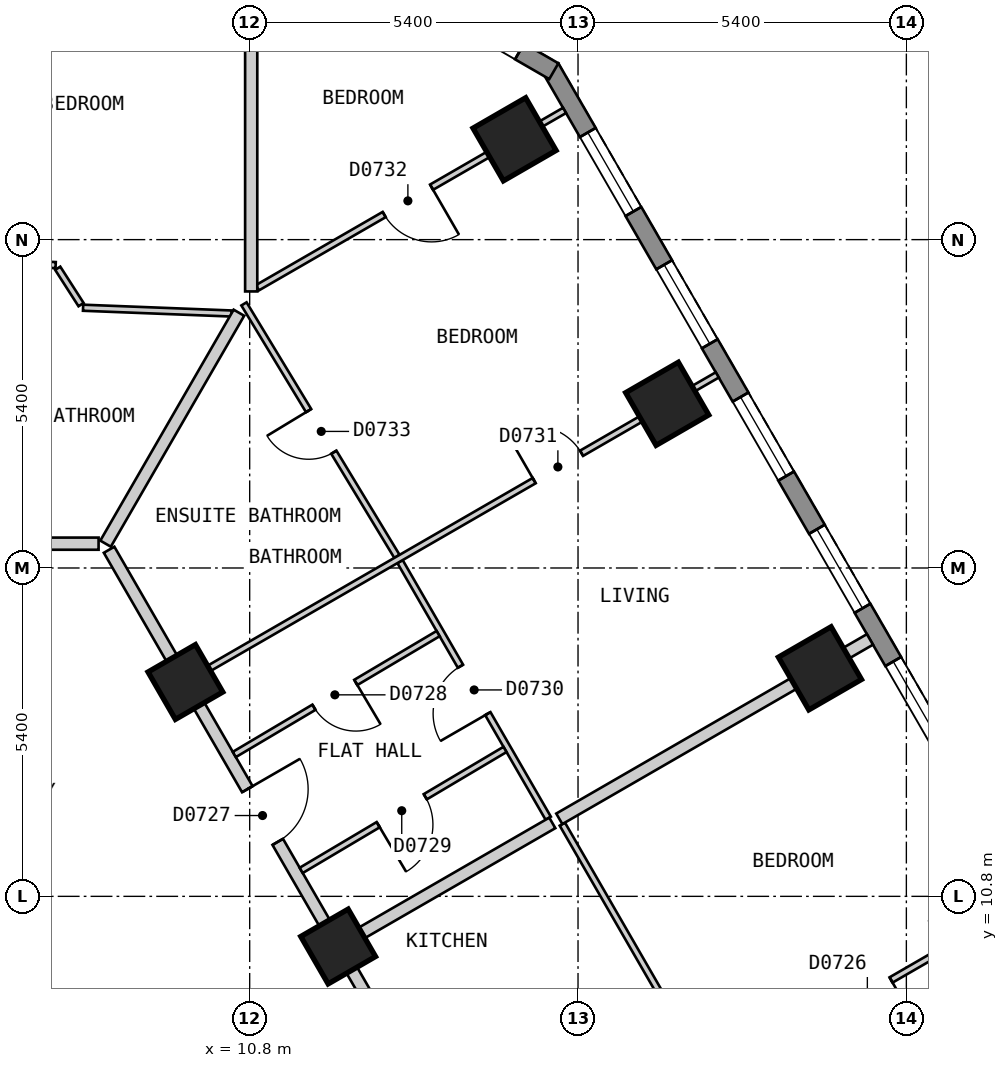
"""IFC4 building model, lengths in metres.
Left out: names, types, materials, properties, quantities, classifications, styles, units other than length and angle.
Written with IfcOpenShell. Run it as: python <this file> out.ifc"""

import sys

from ifc_helpers import new_model, si_unit, direction, frame, frame_2d, origin, origin_2d, place, context, subcontext, project, spatial, polyline, rectangle, outline, extrude, element, fill, save


model = new_model("IFC4")
c1 = context("Model", 3, precision=1e-05, world=origin(), true_north=direction((0.0, 1.0)))
c2 = subcontext(c1, "Body", "Model", "MODEL_VIEW")
j1 = project(units=[si_unit("LENGTHUNIT", "METRE"), si_unit("PLANEANGLEUNIT", "RADIAN")], contexts=[c1])
p1 = place(None, origin())
s1 = spatial("IfcSite", under=j1, at=p1, CompositionType="ELEMENT")
p2 = place(p1, origin())
s2 = spatial("IfcBuilding", under=s1, at=p2, CompositionType="ELEMENT")
p3 = place(p2, frame((0.0, 0.0, 99.0)))
s3 = spatial("IfcBuildingStorey", under=s2, at=p3, CompositionType="ELEMENT", Elevation=99.0)
for number, where, z_axis, x_axis in (
    (1, (20.179, 14.55, 0.0), (0.0, 0.0, 1.0), (-0.5, 0.866, 0.0)),
    (2, (17.667, 18.9, 0.0), (0.0, 0.0, 1.0), (-0.5, 0.866, 0.0)),
    (3, (15.156, 23.25, 0.0), (0.0, 0.0, 1.0), (-0.5, 0.866, 0.0)),
):
    element("IfcColumn", number, at=place(p3, frame(where, z_axis=z_axis, x_axis=x_axis)), inside=s3, PredefinedType="COLUMN", context=c2, shape_type="SweptSolid", body=[
        extrude(rectangle(XDim=1.0, YDim=1.0, at=origin_2d()), origin(), (0.0, 0.0, 1.0), 3.0),
    ])
for number, where, z_axis, x_axis in (
    (4, (12.255, 9.975, 0.0), (0.0, 0.0, 1.0), (-0.5, 0.866, 0.0)),
    (5, (9.743, 14.325, 0.0), (0.0, 0.0, 1.0), (-0.5, 0.866, 0.0)),
):
    element("IfcColumn", number, at=place(p3, frame(where, z_axis=z_axis, x_axis=x_axis)), inside=s3, PredefinedType="COLUMN", context=c2, shape_type="SweptSolid", body=[
        extrude(rectangle(XDim=0.9, YDim=0.9, at=origin_2d()), origin(), (0.0, 0.0, 1.0), 3.0),
    ])
p4 = place(p3, frame((29.027, 1.425, 0.0), z_axis=(0.0, 0.0, 1.0), x_axis=(-0.500027479704, 0.866009537788, 0.0)))
e6 = element("IfcWall", 6, at=p4, inside=s3, PredefinedType="SOLIDWALL", context=c2, shape_type="SweptSolid", body=[
    extrude(outline(polyline([(0.0, -0.15), (26.559, -0.15), (26.478, 0.15), (0.08, 0.15), (0.0, -0.15)])), origin(), (0.0, 0.0, 1.0), 2.7),
])
p5 = place(p4, frame((1.227, 0.0, 0.15)))
e7 = element("IfcOpeningElement", 7, at=p5, cuts=e6, PredefinedType="OPENING", context=c2, shape_type="SweptSolid", body=[
    extrude(rectangle(XDim=1.5, YDim=2.1, at=frame_2d((0.75, 1.05))), frame((0.0, 0.16, 0.0), z_axis=(0.0, -1.0, 0.0), x_axis=(1.0, 0.0, 0.0)), (0.0, 0.0, 1.0), 0.32),
])
p6 = place(p4, frame((3.738, 0.0, 0.15)))
e8 = element("IfcOpeningElement", 8, at=p6, cuts=e6, PredefinedType="OPENING", context=c2, shape_type="SweptSolid", body=[
    extrude(rectangle(XDim=1.5, YDim=2.1, at=frame_2d((0.75, 1.05))), frame((0.0, 0.16, 0.0), z_axis=(0.0, -1.0, 0.0), x_axis=(1.0, 0.0, 0.0)), (0.0, 0.0, 1.0), 0.32),
])
p7 = place(p4, frame((6.25, 0.0, 0.15)))
e9 = element("IfcOpeningElement", 9, at=p7, cuts=e6, PredefinedType="OPENING", context=c2, shape_type="SweptSolid", body=[
    extrude(rectangle(XDim=1.5, YDim=2.1, at=frame_2d((0.75, 1.05))), frame((0.0, 0.16, 0.0), z_axis=(0.0, -1.0, 0.0), x_axis=(1.0, 0.0, 0.0)), (0.0, 0.0, 1.0), 0.32),
])
p8 = place(p4, frame((8.761, 0.0, 0.15)))
e10 = element("IfcOpeningElement", 10, at=p8, cuts=e6, PredefinedType="OPENING", context=c2, shape_type="SweptSolid", body=[
    extrude(rectangle(XDim=1.5, YDim=2.1, at=frame_2d((0.75, 1.05))), frame((0.0, 0.16, 0.0), z_axis=(0.0, -1.0, 0.0), x_axis=(1.0, 0.0, 0.0)), (0.0, 0.0, 1.0), 0.32),
])
p9 = place(p4, frame((11.273, 0.0, 0.15)))
e11 = element("IfcOpeningElement", 11, at=p9, cuts=e6, PredefinedType="OPENING", context=c2, shape_type="SweptSolid", body=[
    extrude(rectangle(XDim=1.5, YDim=2.1, at=frame_2d((0.75, 1.05))), frame((0.0, 0.16, 0.0), z_axis=(0.0, -1.0, 0.0), x_axis=(1.0, 0.0, 0.0)), (0.0, 0.0, 1.0), 0.32),
])
p10 = place(p4, frame((13.785, 0.0, 0.15)))
e12 = element("IfcOpeningElement", 12, at=p10, cuts=e6, PredefinedType="OPENING", context=c2, shape_type="SweptSolid", body=[
    extrude(rectangle(XDim=1.5, YDim=2.1, at=frame_2d((0.75, 1.05))), frame((0.0, 0.16, 0.0), z_axis=(0.0, -1.0, 0.0), x_axis=(1.0, 0.0, 0.0)), (0.0, 0.0, 1.0), 0.32),
])
p11 = place(p4, frame((16.296, 0.0, 0.15)))
e13 = element("IfcOpeningElement", 13, at=p11, cuts=e6, PredefinedType="OPENING", context=c2, shape_type="SweptSolid", body=[
    extrude(rectangle(XDim=1.5, YDim=2.1, at=frame_2d((0.75, 1.05))), frame((0.0, 0.16, 0.0), z_axis=(0.0, -1.0, 0.0), x_axis=(1.0, 0.0, 0.0)), (0.0, 0.0, 1.0), 0.32),
])
p12 = place(p4, frame((18.807, 0.0, 0.15)))
e14 = element("IfcOpeningElement", 14, at=p12, cuts=e6, PredefinedType="OPENING", context=c2, shape_type="SweptSolid", body=[
    extrude(rectangle(XDim=1.5, YDim=2.1, at=frame_2d((0.75, 1.05))), frame((0.0, 0.16, 0.0), z_axis=(0.0, -1.0, 0.0), x_axis=(1.0, 0.0, 0.0)), (0.0, 0.0, 1.0), 0.32),
])
p13 = place(p4, frame((21.319, 0.0, 0.15)))
e15 = element("IfcOpeningElement", 15, at=p13, cuts=e6, PredefinedType="OPENING", context=c2, shape_type="SweptSolid", body=[
    extrude(rectangle(XDim=1.5, YDim=2.1, at=frame_2d((0.75, 1.05))), frame((0.0, 0.16, 0.0), z_axis=(0.0, -1.0, 0.0), x_axis=(1.0, 0.0, 0.0)), (0.0, 0.0, 1.0), 0.32),
])
p14 = place(p4, frame((23.831, 0.0, 0.15)))
e16 = element("IfcOpeningElement", 16, at=p14, cuts=e6, PredefinedType="OPENING", context=c2, shape_type="SweptSolid", body=[
    extrude(rectangle(XDim=1.5, YDim=2.1, at=frame_2d((0.75, 1.05))), frame((0.0, 0.16, 0.0), z_axis=(0.0, -1.0, 0.0), x_axis=(1.0, 0.0, 0.0)), (0.0, 0.0, 1.0), 0.32),
])
p15 = place(p3, frame((15.802, 24.37, 0.0), z_axis=(0.0, 0.0, 1.0), x_axis=(-0.866022959057, 0.500004234368, 0.0)))
e17 = element("IfcWall", 17, at=p15, inside=s3, PredefinedType="SOLIDWALL", context=c2, shape_type="SweptSolid", body=[
    extrude(outline(polyline([(0.0, -0.15), (5.0, -0.15), (4.92, 0.15), (0.08, 0.15), (0.0, -0.15)])), origin(), (0.0, 0.0, 1.0), 2.7),
])
p16 = place(p15, frame((0.65, 0.0, 0.15)))
e18 = element("IfcOpeningElement", 18, at=p16, cuts=e17, PredefinedType="OPENING", context=c2, shape_type="SweptSolid", body=[
    extrude(rectangle(XDim=1.2, YDim=2.1, at=frame_2d((0.6, 1.05))), frame((0.0, 0.16, 0.0), z_axis=(0.0, -1.0, 0.0), x_axis=(1.0, 0.0, 0.0)), (0.0, 0.0, 1.0), 0.32),
])
p17 = place(p15, frame((3.15, 0.0, 0.15)))
e19 = element("IfcOpeningElement", 19, at=p17, cuts=e17, PredefinedType="OPENING", context=c2, shape_type="SweptSolid", body=[
    extrude(rectangle(XDim=1.2, YDim=2.1, at=frame_2d((0.6, 1.05))), frame((0.0, 0.16, 0.0), z_axis=(0.0, -1.0, 0.0), x_axis=(1.0, 0.0, 0.0)), (0.0, 0.0, 1.0), 0.32),
])
p18 = place(p3, frame((8.488, 16.5, 0.0), z_axis=(0.0, 0.0, 1.0), x_axis=(0.499986836607, -0.86603300354, 0.0)))
e20 = element("IfcWall", 20, at=p18, inside=s3, PredefinedType="PARTITIONING", context=c2, shape_type="SweptSolid", body=[
    extrude(rectangle(XDim=20.09, YDim=0.2, at=frame_2d((10.045, 0.0))), origin(), (0.0, 0.0, 1.0), 2.7),
])
p19 = place(p18, frame((14.569, 0.0, 0.0)))
e21 = element("IfcOpeningElement", 21, at=p19, cuts=e20, PredefinedType="OPENING", context=c2, shape_type="SweptSolid", body=[
    extrude(rectangle(XDim=1.0, YDim=2.1, at=frame_2d((0.5, 1.05))), frame((0.0, 0.11, 0.0), z_axis=(0.0, -1.0, 0.0), x_axis=(1.0, 0.0, 0.0)), (0.0, 0.0, 1.0), 0.22),
])
p20 = place(p18, frame((4.547, 0.0, 0.0)))
e22 = element("IfcOpeningElement", 22, at=p20, cuts=e20, PredefinedType="OPENING", context=c2, shape_type="SweptSolid", body=[
    extrude(rectangle(XDim=1.0, YDim=2.1, at=frame_2d((0.5, 1.05))), frame((0.0, 0.11, 0.0), z_axis=(0.0, -1.0, 0.0), x_axis=(1.0, 0.0, 0.0)), (0.0, 0.0, 1.0), 0.22),
])
p21 = place(p3, frame((5.889, 16.6, 0.0), z_axis=(0.0, 0.0, 1.0), x_axis=(1.0, 0.0, 0.0)))
e23 = element("IfcWall", 23, at=p21, inside=s3, PredefinedType="PARTITIONING", context=c2, shape_type="SweptSolid", body=[
    extrude(rectangle(XDim=2.426, YDim=0.2, at=frame_2d((1.213, 0.0))), origin(), (0.0, 0.0, 1.0), 2.7),
])
p22 = place(p3, frame((7.643, 21.129, 0.0), z_axis=(0.0, 0.0, 1.0), x_axis=(0.540427628168, -0.841390503104, 0.0)))
e24 = element("IfcWall", 24, at=p22, inside=s3, PredefinedType="PARTITIONING", context=c2, shape_type="SweptSolid", body=[
    extrude(rectangle(XDim=0.711, YDim=0.1, at=frame_2d((0.355, 0.0))), origin(), (0.0, 0.0, 1.0), 2.7),
])
p23 = place(p3, frame((10.706, 20.543, 0.0), z_axis=(0.0, 0.0, 1.0), x_axis=(0.518240414093, -0.855234981278, 0.0)))
e25 = element("IfcWall", 25, at=p23, inside=s3, PredefinedType="PARTITIONING", context=c2, shape_type="SweptSolid", body=[
    extrude(rectangle(XDim=4.855, YDim=0.1, at=frame_2d((2.427, 0.0))), origin(), (0.0, 0.0, 1.0), 2.7),
])
p24 = place(p23, frame((2.052, 0.0, 0.0)))
e26 = element("IfcOpeningElement", 26, at=p24, cuts=e25, PredefinedType="OPENING", context=c2, shape_type="SweptSolid", body=[
    extrude(rectangle(XDim=0.8, YDim=2.1, at=frame_2d((0.4, 1.05))), frame((0.0, 0.06, 0.0), z_axis=(0.0, -1.0, 0.0), x_axis=(1.0, 0.0, 0.0)), (0.0, 0.0, 1.0), 0.12),
])
p25 = place(p3, frame((13.273, 16.305, 0.0), z_axis=(0.0, 0.0, 1.0), x_axis=(0.500093956194, -0.865971151354, 0.0)))
e27 = element("IfcWall", 27, at=p25, inside=s3, PredefinedType="PARTITIONING", context=c2, shape_type="SweptSolid", body=[
    extrude(rectangle(XDim=4.873, YDim=0.1, at=frame_2d((2.437, 0.0))), origin(), (0.0, 0.0, 1.0), 2.7),
])
p26 = place(p25, frame((1.987, 0.0, 0.0)))
e28 = element("IfcOpeningElement", 28, at=p26, cuts=e27, PredefinedType="OPENING", context=c2, shape_type="SweptSolid", body=[
    extrude(rectangle(XDim=0.9, YDim=2.1, at=frame_2d((0.45, 1.05))), frame((0.0, 0.06, 0.0), z_axis=(0.0, -1.0, 0.0), x_axis=(1.0, 0.0, 0.0)), (0.0, 0.0, 1.0), 0.12),
])
p27 = place(p3, frame((15.942, 11.988, 0.0), z_axis=(0.0, 0.0, 1.0), x_axis=(0.499995794706, -0.866027831699, 0.0)))
e29 = element("IfcWall", 29, at=p27, inside=s3, PredefinedType="PARTITIONING", context=c2, shape_type="SweptSolid", body=[
    extrude(rectangle(XDim=4.922, YDim=0.1, at=frame_2d((2.461, 0.0))), origin(), (0.0, 0.0, 1.0), 2.7),
])
p28 = place(p3, frame((8.06, 20.48, 0.0), z_axis=(0.0, 0.0, 1.0), x_axis=(0.999243345912, -0.038893902497, 0.0)))
e30 = element("IfcWall", 30, at=p28, inside=s3, PredefinedType="PARTITIONING", context=c2, shape_type="SweptSolid", body=[
    extrude(rectangle(XDim=2.442, YDim=0.1, at=frame_2d((1.221, 0.0))), origin(), (0.0, 0.0, 1.0), 2.7),
])
p29 = place(p3, frame((5.49, 21.28, 0.0), z_axis=(0.0, 0.0, 1.0), x_axis=(0.998907627838, -0.046728482187, 0.0)))
e31 = element("IfcWall", 31, at=p29, inside=s3, PredefinedType="PARTITIONING", context=c2, shape_type="SweptSolid", body=[
    extrude(rectangle(XDim=2.121, YDim=0.1, at=frame_2d((1.061, 0.0))), origin(), (0.0, 0.0, 1.0), 2.7),
])
p30 = place(p29, frame((0.902, 0.0, 0.0)))
e32 = element("IfcOpeningElement", 32, at=p30, cuts=e31, PredefinedType="OPENING", context=c2, shape_type="SweptSolid", body=[
    extrude(rectangle(XDim=0.8, YDim=2.1, at=frame_2d((0.4, 1.05))), frame((0.0, 0.06, 0.0), z_axis=(0.0, -1.0, 0.0), x_axis=(1.0, 0.0, 0.0)), (0.0, 0.0, 1.0), 0.12),
])
p31 = place(p3, frame((14.853, 5.675, 0.0), z_axis=(0.0, 0.0, 1.0), x_axis=(0.866016855193, 0.500014806302, 0.0)))
e33 = element("IfcWall", 33, at=p31, inside=s3, PredefinedType="PARTITIONING", context=c2, shape_type="SweptSolid", body=[
    extrude(rectangle(XDim=10.0, YDim=0.1, at=frame_2d((5.0, 0.0))), origin(), (0.0, 0.0, 1.0), 2.7),
])
p32 = place(p31, frame((1.6, 0.0, 0.0)))
e34 = element("IfcOpeningElement", 34, at=p32, cuts=e33, PredefinedType="OPENING", context=c2, shape_type="SweptSolid", body=[
    extrude(rectangle(XDim=0.8, YDim=2.1, at=frame_2d((0.4, 1.05))), frame((0.0, 0.06, 0.0), z_axis=(0.0, -1.0, 0.0), x_axis=(1.0, 0.0, 0.0)), (0.0, 0.0, 1.0), 0.12),
])
p33 = place(p31, frame((6.6, 0.0, 0.0)))
e35 = element("IfcOpeningElement", 35, at=p33, cuts=e33, PredefinedType="OPENING", context=c2, shape_type="SweptSolid", body=[
    extrude(rectangle(XDim=0.9, YDim=2.1, at=frame_2d((0.45, 1.05))), frame((0.0, 0.06, 0.0), z_axis=(0.0, -1.0, 0.0), x_axis=(1.0, 0.0, 0.0)), (0.0, 0.0, 1.0), 0.12),
])
p34 = place(p3, frame((9.83, 14.375, 0.0), z_axis=(0.0, 0.0, 1.0), x_axis=(0.866016855193, 0.500014806302, 0.0)))
e36 = element("IfcWall", 36, at=p34, inside=s3, PredefinedType="PARTITIONING", context=c2, shape_type="SweptSolid", body=[
    extrude(rectangle(XDim=10.0, YDim=0.1, at=frame_2d((5.0, 0.0))), origin(), (0.0, 0.0, 1.0), 2.7),
])
p35 = place(p34, frame((6.523, 0.0, 0.0)))
e37 = element("IfcOpeningElement", 37, at=p35, cuts=e36, PredefinedType="OPENING", context=c2, shape_type="SweptSolid", body=[
    extrude(rectangle(XDim=0.9, YDim=2.1, at=frame_2d((0.45, 1.05))), frame((0.0, 0.06, 0.0), z_axis=(0.0, -1.0, 0.0), x_axis=(1.0, 0.0, 0.0)), (0.0, 0.0, 1.0), 0.12),
])
p36 = place(p3, frame((10.926, 20.808, 0.0), z_axis=(0.0, 0.0, 1.0), x_axis=(0.86600925905, 0.500027962457, 0.0)))
e38 = element("IfcWall", 38, at=p36, inside=s3, PredefinedType="PARTITIONING", context=c2, shape_type="SweptSolid", body=[
    extrude(rectangle(XDim=5.834, YDim=0.1, at=frame_2d((2.917, 0.0))), origin(), (0.0, 0.0, 1.0), 2.7),
])
p37 = place(p36, frame((2.409, 0.0, 0.0)))
e39 = element("IfcOpeningElement", 39, at=p37, cuts=e38, PredefinedType="OPENING", context=c2, shape_type="SweptSolid", body=[
    extrude(rectangle(XDim=0.9, YDim=2.1, at=frame_2d((0.45, 1.05))), frame((0.0, 0.06, 0.0), z_axis=(0.0, -1.0, 0.0), x_axis=(1.0, 0.0, 0.0)), (0.0, 0.0, 1.0), 0.12),
])
p38 = place(p3, frame((11.647, 11.227, 0.0), z_axis=(0.0, 0.0, 1.0), x_axis=(0.859997349349, 0.510298500011, 0.0)))
e40 = element("IfcWall", 40, at=p38, inside=s3, PredefinedType="PARTITIONING", context=c2, shape_type="SweptSolid", body=[
    extrude(rectangle(XDim=3.898, YDim=0.1, at=frame_2d((1.949, 0.0))), origin(), (0.0, 0.0, 1.0), 2.7),
])
p39 = place(p38, frame((1.473, 0.0, 0.0)))
e41 = element("IfcOpeningElement", 41, at=p39, cuts=e40, PredefinedType="OPENING", context=c2, shape_type="SweptSolid", body=[
    extrude(rectangle(XDim=0.9, YDim=2.1, at=frame_2d((0.45, 1.05))), frame((0.0, 0.06, 0.0), z_axis=(0.0, -1.0, 0.0), x_axis=(1.0, 0.0, 0.0)), (0.0, 0.0, 1.0), 0.12),
])
p40 = place(p3, frame((10.547, 13.133, 0.0), z_axis=(0.0, 0.0, 1.0), x_axis=(0.860090994311, 0.510140648749, 0.0)))
e42 = element("IfcWall", 42, at=p40, inside=s3, PredefinedType="PARTITIONING", context=c2, shape_type="SweptSolid", body=[
    extrude(rectangle(XDim=3.897, YDim=0.1, at=frame_2d((1.948, 0.0))), origin(), (0.0, 0.0, 1.0), 2.7),
])
p41 = place(p40, frame((1.523, 0.0, 0.0)))
e43 = element("IfcOpeningElement", 43, at=p41, cuts=e42, PredefinedType="OPENING", context=c2, shape_type="SweptSolid", body=[
    extrude(rectangle(XDim=0.8, YDim=2.1, at=frame_2d((0.4, 1.05))), frame((0.0, 0.06, 0.0), z_axis=(0.0, -1.0, 0.0), x_axis=(1.0, 0.0, 0.0)), (0.0, 0.0, 1.0), 0.12),
])
p42 = place(p3, frame((8.43, 16.6, 0.0), z_axis=(0.0, 0.0, 1.0), x_axis=(0.500072613115, 0.865983476524, 0.0)))
e44 = element("IfcWall", 44, at=p42, inside=s3, PredefinedType="PARTITIONING", context=c2, shape_type="SweptSolid", body=[
    extrude(rectangle(XDim=4.385, YDim=0.2, at=frame_2d((2.193, 0.0))), origin(), (0.0, 0.0, 1.0), 2.7),
])
p43 = place(p3, frame((10.825, 20.748, 0.0), z_axis=(0.0, 0.0, 1.0), x_axis=(0.0, 1.0, 0.0)))
e45 = element("IfcWall", 45, at=p43, inside=s3, PredefinedType="PARTITIONING", context=c2, shape_type="SweptSolid", body=[
    extrude(rectangle(XDim=5.952, YDim=0.2, at=frame_2d((2.976, 0.0))), origin(), (0.0, 0.0, 1.0), 2.7),
])
p44 = place(p3, frame((12.342, 10.025, 0.0), z_axis=(0.0, 0.0, 1.0), x_axis=(0.866033886885, 0.499985306551, 0.0)))
e46 = element("IfcWall", 46, at=p44, inside=s3, PredefinedType="PARTITIONING", context=c2, shape_type="SweptSolid", body=[
    extrude(rectangle(XDim=3.966, YDim=0.2, at=frame_2d((1.983, 0.0))), origin(), (0.0, 0.0, 1.0), 2.7),
])
p45 = place(p3, frame((15.892, 12.075, 0.0), z_axis=(0.0, 0.0, 1.0), x_axis=(0.866000883696, 0.500042467634, 0.0)))
e47 = element("IfcWall", 47, at=p45, inside=s3, PredefinedType="PARTITIONING", context=c2, shape_type="SweptSolid", body=[
    extrude(rectangle(XDim=5.899, YDim=0.2, at=frame_2d((2.95, 0.0))), origin(), (0.0, 0.0, 1.0), 2.7),
])
p46 = place(p10, origin())
e48 = element("IfcWindow", 48, at=p46, inside=s3, PartitioningType="SINGLE_PANEL", PredefinedType="WINDOW", context=c2, shape_type="SweptSolid", body=[
    extrude(rectangle(XDim=1.5, YDim=2.1, at=frame_2d((0.75, 1.05))), frame((0.0, 0.03, 0.0), z_axis=(0.0, -1.0, 0.0), x_axis=(1.0, 0.0, 0.0)), (0.0, 0.0, 1.0), 0.06),
])
fill(e12, e48)
p47 = place(p11, origin())
e49 = element("IfcWindow", 49, at=p47, inside=s3, PartitioningType="SINGLE_PANEL", PredefinedType="WINDOW", context=c2, shape_type="SweptSolid", body=[
    extrude(rectangle(XDim=1.5, YDim=2.1, at=frame_2d((0.75, 1.05))), frame((0.0, 0.03, 0.0), z_axis=(0.0, -1.0, 0.0), x_axis=(1.0, 0.0, 0.0)), (0.0, 0.0, 1.0), 0.06),
])
fill(e13, e49)
p48 = place(p12, origin())
e50 = element("IfcWindow", 50, at=p48, inside=s3, PartitioningType="SINGLE_PANEL", PredefinedType="WINDOW", context=c2, shape_type="SweptSolid", body=[
    extrude(rectangle(XDim=1.5, YDim=2.1, at=frame_2d((0.75, 1.05))), frame((0.0, 0.03, 0.0), z_axis=(0.0, -1.0, 0.0), x_axis=(1.0, 0.0, 0.0)), (0.0, 0.0, 1.0), 0.06),
])
fill(e14, e50)
p49 = place(p13, origin())
e51 = element("IfcWindow", 51, at=p49, inside=s3, PartitioningType="SINGLE_PANEL", PredefinedType="WINDOW", context=c2, shape_type="SweptSolid", body=[
    extrude(rectangle(XDim=1.5, YDim=2.1, at=frame_2d((0.75, 1.05))), frame((0.0, 0.03, 0.0), z_axis=(0.0, -1.0, 0.0), x_axis=(1.0, 0.0, 0.0)), (0.0, 0.0, 1.0), 0.06),
])
fill(e15, e51)
p50 = place(p14, origin())
e52 = element("IfcWindow", 52, at=p50, inside=s3, PartitioningType="SINGLE_PANEL", PredefinedType="WINDOW", context=c2, shape_type="SweptSolid", body=[
    extrude(rectangle(XDim=1.5, YDim=2.1, at=frame_2d((0.75, 1.05))), frame((0.0, 0.03, 0.0), z_axis=(0.0, -1.0, 0.0), x_axis=(1.0, 0.0, 0.0)), (0.0, 0.0, 1.0), 0.06),
])
fill(e16, e52)
p51 = place(p16, origin())
e53 = element("IfcWindow", 53, at=p51, inside=s3, PartitioningType="SINGLE_PANEL", PredefinedType="WINDOW", context=c2, shape_type="SweptSolid", body=[
    extrude(rectangle(XDim=1.2, YDim=2.1, at=frame_2d((0.6, 1.05))), frame((0.0, 0.03, 0.0), z_axis=(0.0, -1.0, 0.0), x_axis=(1.0, 0.0, 0.0)), (0.0, 0.0, 1.0), 0.06),
])
fill(e18, e53)
p52 = place(p33, origin())
e54 = element("IfcDoor", 54, at=p52, inside=s3, OperationType="SINGLE_SWING_RIGHT", PredefinedType="DOOR", context=c2, shape_type="SweptSolid", body=[
    extrude(rectangle(XDim=0.9, YDim=2.1, at=frame_2d((0.45, 1.05))), frame((0.0, 0.025, 0.0), z_axis=(0.0, -1.0, 0.0), x_axis=(1.0, 0.0, 0.0)), (0.0, 0.0, 1.0), 0.05),
])
fill(e35, e54)
p53 = place(p20, origin())
e55 = element("IfcDoor", 55, at=p53, inside=s3, OperationType="SINGLE_SWING_LEFT", PredefinedType="DOOR", context=c2, shape_type="SweptSolid", body=[
    extrude(rectangle(XDim=1.0, YDim=2.1, at=frame_2d((0.5, 1.05))), frame((0.0, 0.025, 0.0), z_axis=(0.0, -1.0, 0.0), x_axis=(1.0, 0.0, 0.0)), (0.0, 0.0, 1.0), 0.05),
])
fill(e22, e55)
p54 = place(p41, origin())
e56 = element("IfcDoor", 56, at=p54, inside=s3, OperationType="SINGLE_SWING_RIGHT", PredefinedType="DOOR", context=c2, shape_type="SweptSolid", body=[
    extrude(rectangle(XDim=0.8, YDim=2.1, at=frame_2d((0.4, 1.05))), frame((0.0, 0.025, 0.0), z_axis=(0.0, -1.0, 0.0), x_axis=(1.0, 0.0, 0.0)), (0.0, 0.0, 1.0), 0.05),
])
fill(e43, e56)
p55 = place(p39, origin())
e57 = element("IfcDoor", 57, at=p55, inside=s3, OperationType="SINGLE_SWING_LEFT", PredefinedType="DOOR", context=c2, shape_type="SweptSolid", body=[
    extrude(rectangle(XDim=0.9, YDim=2.1, at=frame_2d((0.45, 1.05))), frame((0.0, 0.025, 0.0), z_axis=(0.0, -1.0, 0.0), x_axis=(1.0, 0.0, 0.0)), (0.0, 0.0, 1.0), 0.05),
])
fill(e41, e57)
p56 = place(p26, origin())
e58 = element("IfcDoor", 58, at=p56, inside=s3, OperationType="SINGLE_SWING_RIGHT", PredefinedType="DOOR", context=c2, shape_type="SweptSolid", body=[
    extrude(rectangle(XDim=0.9, YDim=2.1, at=frame_2d((0.45, 1.05))), frame((0.0, 0.025, 0.0), z_axis=(0.0, -1.0, 0.0), x_axis=(1.0, 0.0, 0.0)), (0.0, 0.0, 1.0), 0.05),
])
fill(e28, e58)
p57 = place(p35, origin())
e59 = element("IfcDoor", 59, at=p57, inside=s3, OperationType="SINGLE_SWING_LEFT", PredefinedType="DOOR", context=c2, shape_type="SweptSolid", body=[
    extrude(rectangle(XDim=0.9, YDim=2.1, at=frame_2d((0.45, 1.05))), frame((0.0, 0.025, 0.0), z_axis=(0.0, -1.0, 0.0), x_axis=(1.0, 0.0, 0.0)), (0.0, 0.0, 1.0), 0.05),
])
fill(e37, e59)
p58 = place(p37, origin())
e60 = element("IfcDoor", 60, at=p58, inside=s3, OperationType="SINGLE_SWING_RIGHT", PredefinedType="DOOR", context=c2, shape_type="SweptSolid", body=[
    extrude(rectangle(XDim=0.9, YDim=2.1, at=frame_2d((0.45, 1.05))), frame((0.0, 0.025, 0.0), z_axis=(0.0, -1.0, 0.0), x_axis=(1.0, 0.0, 0.0)), (0.0, 0.0, 1.0), 0.05),
])
fill(e39, e60)
p59 = place(p24, origin())
e61 = element("IfcDoor", 61, at=p59, inside=s3, OperationType="SINGLE_SWING_LEFT", PredefinedType="DOOR", context=c2, shape_type="SweptSolid", body=[
    extrude(rectangle(XDim=0.8, YDim=2.1, at=frame_2d((0.4, 1.05))), frame((0.0, 0.025, 0.0), z_axis=(0.0, -1.0, 0.0), x_axis=(1.0, 0.0, 0.0)), (0.0, 0.0, 1.0), 0.05),
])
fill(e26, e61)
save(model, sys.argv[1])
